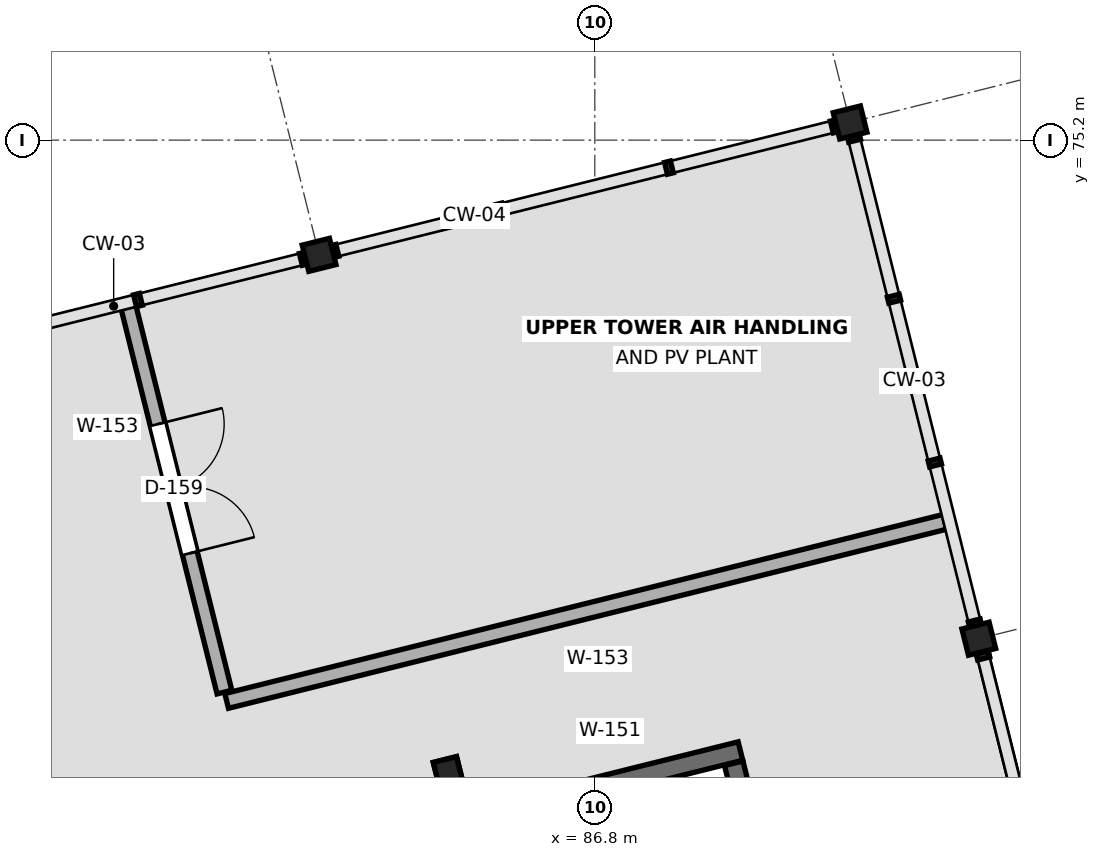
"""IFC4 building model, lengths in metres.
Left out: names, types, materials, properties, quantities, classifications, styles, units other than length and angle.
Written with IfcOpenShell. Run it as: python <this file> out.ifc"""

import sys

from ifc_helpers import new_model, si_unit, direction, frame, frame_2d, origin, origin_2d, place, context, subcontext, project, spatial, rectangle, i_section, extrude, element, fill, save


model = new_model("IFC4")
c1 = context("Model", 3, precision=1e-05, world=origin(), true_north=direction((0.0, 1.0)))
c2 = subcontext(c1, "Body", "Model", "MODEL_VIEW")
j1 = project(units=[si_unit("LENGTHUNIT", "METRE"), si_unit("PLANEANGLEUNIT", "RADIAN")], contexts=[c1])
p1 = place(None, origin())
s1 = spatial("IfcSite", under=j1, at=p1, CompositionType="ELEMENT")
p2 = place(p1, origin())
s2 = spatial("IfcBuilding", under=s1, at=p2, CompositionType="ELEMENT")
p3 = place(p2, frame((0.0, 0.0, 61.2)))
s3 = spatial("IfcBuildingStorey", under=s2, at=p3, CompositionType="ELEMENT", Elevation=61.2)
for number, where, z_axis, x_axis in (
    (1, (84.866, 66.898, 0.0), (0.0, 0.0, 1.0), (0.97, 0.242, 0.0)),
    (2, (83.173, 73.691, 0.0), (0.0, 0.0, 1.0), (0.97, 0.242, 0.0)),
    (3, (91.852, 68.64, 0.0), (0.0, 0.0, 1.0), (0.97, 0.242, 0.0)),
    (4, (90.159, 75.432, 0.0), (0.0, 0.0, 1.0), (0.97, 0.242, 0.0)),
):
    element("IfcColumn", number, at=place(p3, frame(where, z_axis=z_axis, x_axis=x_axis)), inside=s3, PredefinedType="COLUMN", context=c2, shape_type="SweptSolid", body=[
        extrude(rectangle(XDim=0.315, YDim=0.315, at=origin_2d()), origin(), (0.0, 0.0, 1.0), 4.2),
    ])
p4 = place(p3, frame((84.866, 66.898, 4.2), z_axis=(0.0, 0.0, 1.0), x_axis=(0.970295726276, 0.2419218956, 0.0)))
e5 = element("IfcColumn", 5, at=p4, inside=s3, PredefinedType="COLUMN", context=c2, shape_type="SweptSolid", body=[
    extrude(rectangle(XDim=0.315, YDim=0.315, at=origin_2d()), origin(), (0.0, 0.0, 1.0), 1.804),
])
for number, where, z_axis, x_axis in (
    (6, (91.852, 68.64, 4.2), (0.0, 0.0, 1.0), (0.97, 0.242, 0.0)),
    (7, (90.159, 75.432, 4.2), (0.0, 0.0, 1.0), (0.97, 0.242, 0.0)),
    (8, (83.173, 73.691, 4.2), (0.0, 0.0, 1.0), (0.97, 0.242, 0.0)),
):
    element("IfcColumn", number, at=place(p3, frame(where, z_axis=z_axis, x_axis=x_axis)), inside=s3, PredefinedType="COLUMN", context=c2, shape_type="SweptSolid", body=[
        extrude(i_section(OverallWidth=0.369, OverallDepth=0.356, WebThickness=0.011, FlangeThickness=0.018, at=origin_2d()), origin(), (0.0, 0.0, 1.0), 4.8),
    ])
p5 = place(p3, frame((88.717, 67.163, 0.0), z_axis=(0.0, 0.0, 1.0), x_axis=(-0.970294894235, -0.241925232711, 0.0)))
e9 = element("IfcWall", 9, at=p5, inside=s3, PredefinedType="SHEAR", context=c2, shape_type="SweptSolid", body=[
    extrude(rectangle(XDim=3.2, YDim=0.25, at=frame_2d((1.6, 0.0))), origin(), (0.0, 0.0, 1.0), 4.032),
])
p6 = place(p3, frame((89.155, 64.886, 0.0), z_axis=(0.0, 0.0, 1.0), x_axis=(-0.241903146974, 0.970300400641, 0.0)))
e10 = element("IfcWall", 10, at=p6, inside=s3, PredefinedType="SHEAR", context=c2, shape_type="SweptSolid", body=[
    extrude(rectangle(XDim=2.18, YDim=0.25, at=frame_2d((1.09, 0.0))), origin(), (0.0, 0.0, 1.0), 4.032),
])
p7 = place(p3, frame((81.956, 67.822, 0.0), z_axis=(0.0, 0.0, 1.0), x_axis=(0.970298591584, 0.241910403187, 0.0)))
e11 = element("IfcWall", 11, at=p7, inside=s3, PredefinedType="STANDARD", context=c2, shape_type="SweptSolid", body=[
    extrude(rectangle(XDim=9.74, YDim=0.2, at=frame_2d((4.87, 0.0))), origin(), (0.0, 0.0, 1.0), 3.92),
])
p8 = place(p3, frame((80.665, 73.003, 0.0), z_axis=(0.0, 0.0, 1.0), x_axis=(0.241897292077, -0.970301860292, 0.0)))
e12 = element("IfcWall", 12, at=p8, inside=s3, PredefinedType="STANDARD", context=c2, shape_type="SweptSolid", body=[
    extrude(rectangle(XDim=5.22, YDim=0.2, at=frame_2d((2.61, 0.0))), origin(), (0.0, 0.0, 1.0), 3.92),
])
p9 = place(p8, frame((1.587, 0.0, 0.0)))
e13 = element("IfcOpeningElement", 13, at=p9, cuts=e12, PredefinedType="OPENING", context=c2, shape_type="SweptSolid", body=[
    extrude(rectangle(XDim=1.75, YDim=2.4, at=frame_2d((0.875, 1.2))), frame((0.0, 0.112, 0.0), z_axis=(0.0, -1.0, 0.0), x_axis=(1.0, 0.0, 0.0)), (0.0, 0.0, 1.0), 0.224),
])
p10 = place(p9, origin())
e14 = element("IfcDoor", 14, at=p10, inside=s3, OperationType="DOUBLE_DOOR_SINGLE_SWING", PredefinedType="DOOR", context=c2, shape_type="SweptSolid", body=[
    extrude(rectangle(XDim=1.75, YDim=2.4, at=frame_2d((0.875, 1.2))), frame((0.0, 0.025, 0.0), z_axis=(0.0, -1.0, 0.0), x_axis=(1.0, 0.0, 0.0)), (0.0, 0.0, 1.0), 0.05),
])
fill(e13, e14)
save(model, sys.argv[1])
